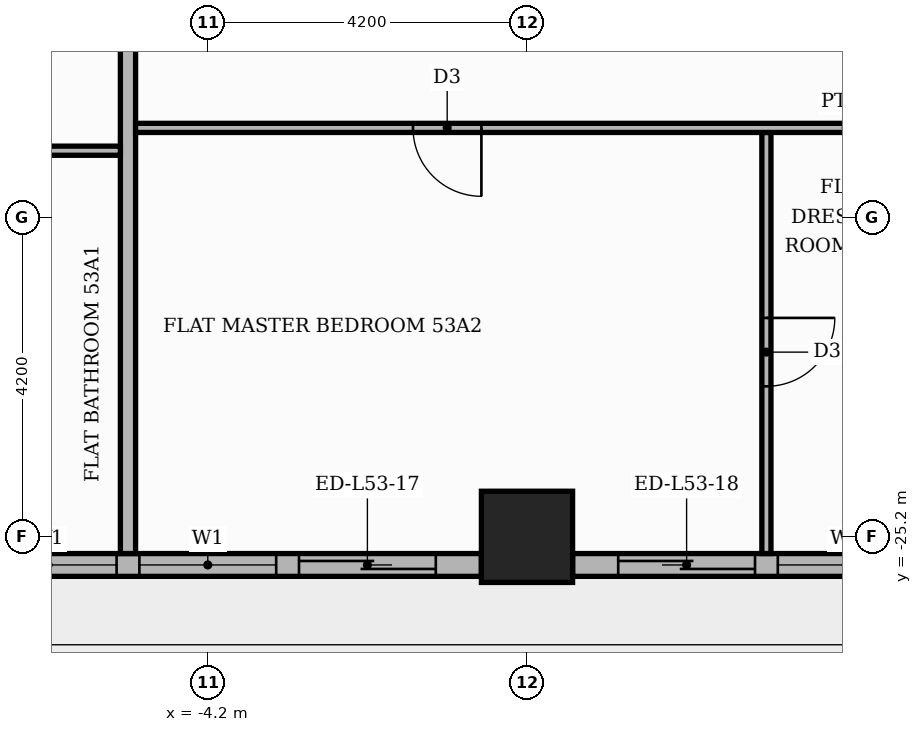
"""IFC4 building model, lengths in metres.
Left out: names, types, materials, properties, quantities, classifications, styles, units other than length and angle.
Written with IfcOpenShell. Run it as: python <this file> out.ifc"""

import sys

from ifc_helpers import new_model, si_unit, direction, frame, frame_2d, origin, origin_2d, place, context, subcontext, project, spatial, rectangle, extrude, element, fill, save


model = new_model("IFC4")
c1 = context("Model", 3, precision=1e-05, world=origin(), true_north=direction((0.0, 1.0)))
c2 = subcontext(c1, "Body", "Model", "MODEL_VIEW")
j1 = project(units=[si_unit("LENGTHUNIT", "METRE"), si_unit("PLANEANGLEUNIT", "RADIAN")], contexts=[c1])
p1 = place(None, origin())
s1 = spatial("IfcSite", under=j1, at=p1, CompositionType="ELEMENT")
p2 = place(p1, origin())
s2 = spatial("IfcBuilding", under=s1, at=p2, CompositionType="ELEMENT")
p3 = place(p2, frame((0.0, 0.0, 223.5)))
s3 = spatial("IfcBuildingStorey", under=s2, at=p3, CompositionType="ELEMENT", Elevation=223.5)
p4 = place(p3, frame((0.0, -25.2, 0.0), z_axis=(0.0, 0.0, 1.0), x_axis=(1.0, 0.0, 0.0)))
e1 = element("IfcColumn", 1, at=p4, inside=s3, PredefinedType="COLUMN", context=c2, shape_type="SweptSolid", body=[
    extrude(rectangle(XDim=1.2, YDim=1.2, at=origin_2d()), origin(), (0.0, 0.0, 1.0), 3.9),
])
p5 = place(p3, frame((-7.8, -25.57, 0.0), z_axis=(0.0, 0.0, 1.0), x_axis=(1.0, 0.0, 0.0)))
e2 = element("IfcWall", 2, at=p5, inside=s3, PredefinedType="STANDARD", context=c2, shape_type="SweptSolid", body=[
    extrude(rectangle(XDim=7.2, YDim=0.3, at=frame_2d((3.6, 0.0))), origin(), (0.0, 0.0, 1.0), 3.48),
])
p6 = place(p5, frame((0.6, 0.0, 0.9)))
e3 = element("IfcOpeningElement", 3, at=p6, cuts=e2, PredefinedType="OPENING", context=c2, shape_type="SweptSolid", body=[
    extrude(rectangle(XDim=1.8, YDim=2.1, at=frame_2d((0.9, 1.05))), frame((0.0, 0.16, 0.0), z_axis=(0.0, -1.0, 0.0), x_axis=(1.0, 0.0, 0.0)), (0.0, 0.0, 1.0), 0.32),
])
p7 = place(p5, frame((2.7, 0.0, 0.9)))
e4 = element("IfcOpeningElement", 4, at=p7, cuts=e2, PredefinedType="OPENING", context=c2, shape_type="SweptSolid", body=[
    extrude(rectangle(XDim=1.8, YDim=2.1, at=frame_2d((0.9, 1.05))), frame((0.0, 0.16, 0.0), z_axis=(0.0, -1.0, 0.0), x_axis=(1.0, 0.0, 0.0)), (0.0, 0.0, 1.0), 0.32),
])
p8 = place(p5, frame((4.8, 0.0, 0.0)))
e5 = element("IfcOpeningElement", 5, at=p8, cuts=e2, PredefinedType="OPENING", context=c2, shape_type="SweptSolid", body=[
    extrude(rectangle(XDim=1.8, YDim=2.4, at=frame_2d((0.9, 1.2))), frame((0.0, 0.16, 0.0), z_axis=(0.0, -1.0, 0.0), x_axis=(1.0, 0.0, 0.0)), (0.0, 0.0, 1.0), 0.32),
])
p9 = place(p3, frame((0.6, -25.57, 0.0), z_axis=(0.0, 0.0, 1.0), x_axis=(1.0, 0.0, 0.0)))
e6 = element("IfcWall", 6, at=p9, inside=s3, PredefinedType="STANDARD", context=c2, shape_type="SweptSolid", body=[
    extrude(rectangle(XDim=7.2, YDim=0.3, at=frame_2d((3.6, 0.0))), origin(), (0.0, 0.0, 1.0), 3.48),
])
p10 = place(p9, frame((0.6, 0.0, 0.0)))
e7 = element("IfcOpeningElement", 7, at=p10, cuts=e6, PredefinedType="OPENING", context=c2, shape_type="SweptSolid", body=[
    extrude(rectangle(XDim=1.8, YDim=2.4, at=frame_2d((0.9, 1.2))), frame((0.0, 0.16, 0.0), z_axis=(0.0, -1.0, 0.0), x_axis=(1.0, 0.0, 0.0)), (0.0, 0.0, 1.0), 0.32),
])
p11 = place(p9, frame((2.7, 0.0, 0.9)))
e8 = element("IfcOpeningElement", 8, at=p11, cuts=e6, PredefinedType="OPENING", context=c2, shape_type="SweptSolid", body=[
    extrude(rectangle(XDim=1.8, YDim=2.1, at=frame_2d((0.9, 1.05))), frame((0.0, 0.16, 0.0), z_axis=(0.0, -1.0, 0.0), x_axis=(1.0, 0.0, 0.0)), (0.0, 0.0, 1.0), 0.32),
])
p12 = place(p9, frame((4.8, 0.0, 0.9)))
e9 = element("IfcOpeningElement", 9, at=p12, cuts=e6, PredefinedType="OPENING", context=c2, shape_type="SweptSolid", body=[
    extrude(rectangle(XDim=1.8, YDim=2.1, at=frame_2d((0.9, 1.05))), frame((0.0, 0.16, 0.0), z_axis=(0.0, -1.0, 0.0), x_axis=(1.0, 0.0, 0.0)), (0.0, 0.0, 1.0), 0.32),
])
p13 = place(p3, frame((-5.25, -25.42, 0.0), z_axis=(0.0, 0.0, 1.0), x_axis=(0.0, 1.0, 0.0)))
e10 = element("IfcWall", 10, at=p13, inside=s3, PredefinedType="PARTITIONING", context=c2, shape_type="SweptSolid", body=[
    extrude(rectangle(XDim=11.67, YDim=0.2, at=frame_2d((5.835, 0.0))), origin(), (0.0, 0.0, 1.0), 3.48),
])
p14 = place(p3, frame((3.15, -25.42, 0.0), z_axis=(0.0, 0.0, 1.0), x_axis=(0.0, 1.0, 0.0)))
e11 = element("IfcWall", 11, at=p14, inside=s3, PredefinedType="PARTITIONING", context=c2, shape_type="SweptSolid", body=[
    extrude(rectangle(XDim=5.54, YDim=0.12, at=frame_2d((2.77, 0.0))), origin(), (0.0, 0.0, 1.0), 3.48),
])
p15 = place(p14, frame((2.2, 0.0, 0.0)))
e12 = element("IfcOpeningElement", 12, at=p15, cuts=e11, PredefinedType="OPENING", context=c2, shape_type="SweptSolid", body=[
    extrude(rectangle(XDim=0.9, YDim=2.1, at=frame_2d((0.45, 1.05))), frame((0.0, 0.07, 0.0), z_axis=(0.0, -1.0, 0.0), x_axis=(1.0, 0.0, 0.0)), (0.0, 0.0, 1.0), 0.14),
])
p16 = place(p3, frame((-25.42, -20.12, 0.0), z_axis=(0.0, 0.0, 1.0), x_axis=(1.0, 0.0, 0.0)))
e13 = element("IfcWall", 13, at=p16, inside=s3, PredefinedType="PARTITIONING", context=c2, shape_type="SweptSolid", body=[
    extrude(rectangle(XDim=20.07, YDim=0.12, at=frame_2d((10.035, 0.0))), origin(), (0.0, 0.0, 1.0), 3.48),
])
p17 = place(p16, frame((10.22, 0.0, 0.0)))
e14 = element("IfcOpeningElement", 14, at=p17, cuts=e13, PredefinedType="OPENING", context=c2, shape_type="SweptSolid", body=[
    extrude(rectangle(XDim=1.0, YDim=2.1, at=frame_2d((0.5, 1.05))), frame((0.0, 0.07, 0.0), z_axis=(0.0, -1.0, 0.0), x_axis=(1.0, 0.0, 0.0)), (0.0, 0.0, 1.0), 0.14),
])
p18 = place(p16, frame((13.42, 0.0, 0.0)))
e15 = element("IfcOpeningElement", 15, at=p18, cuts=e13, PredefinedType="OPENING", context=c2, shape_type="SweptSolid", body=[
    extrude(rectangle(XDim=0.9, YDim=2.1, at=frame_2d((0.45, 1.05))), frame((0.0, 0.07, 0.0), z_axis=(0.0, -1.0, 0.0), x_axis=(1.0, 0.0, 0.0)), (0.0, 0.0, 1.0), 0.14),
])
p19 = place(p3, frame((-5.15, -19.82, 0.0), z_axis=(0.0, 0.0, 1.0), x_axis=(1.0, 0.0, 0.0)))
e16 = element("IfcWall", 16, at=p19, inside=s3, PredefinedType="PARTITIONING", context=c2, shape_type="SweptSolid", body=[
    extrude(rectangle(XDim=18.7, YDim=0.12, at=frame_2d((9.35, 0.0))), origin(), (0.0, 0.0, 1.0), 3.48),
])
p20 = place(p19, frame((3.65, 0.0, 0.0)))
e17 = element("IfcOpeningElement", 17, at=p20, cuts=e16, PredefinedType="OPENING", context=c2, shape_type="SweptSolid", body=[
    extrude(rectangle(XDim=0.9, YDim=2.1, at=frame_2d((0.45, 1.05))), frame((0.0, 0.07, 0.0), z_axis=(0.0, -1.0, 0.0), x_axis=(1.0, 0.0, 0.0)), (0.0, 0.0, 1.0), 0.14),
])
p21 = place(p19, frame((15.15, 0.0, 0.0)))
e18 = element("IfcOpeningElement", 18, at=p21, cuts=e16, PredefinedType="OPENING", context=c2, shape_type="SweptSolid", body=[
    extrude(rectangle(XDim=1.0, YDim=2.1, at=frame_2d((0.5, 1.05))), frame((0.0, 0.07, 0.0), z_axis=(0.0, -1.0, 0.0), x_axis=(1.0, 0.0, 0.0)), (0.0, 0.0, 1.0), 0.14),
])
p22 = place(p6, origin())
e19 = element("IfcWindow", 19, at=p22, inside=s3, PartitioningType="SINGLE_PANEL", PredefinedType="WINDOW", context=c2, shape_type="SweptSolid", body=[
    extrude(rectangle(XDim=1.8, YDim=2.1, at=frame_2d((0.9, 1.05))), frame((0.0, 0.03, 0.0), z_axis=(0.0, -1.0, 0.0), x_axis=(1.0, 0.0, 0.0)), (0.0, 0.0, 1.0), 0.06),
])
fill(e3, e19)
p23 = place(p7, origin())
e20 = element("IfcWindow", 20, at=p23, inside=s3, PartitioningType="SINGLE_PANEL", PredefinedType="WINDOW", context=c2, shape_type="SweptSolid", body=[
    extrude(rectangle(XDim=1.8, YDim=2.1, at=frame_2d((0.9, 1.05))), frame((0.0, 0.03, 0.0), z_axis=(0.0, -1.0, 0.0), x_axis=(1.0, 0.0, 0.0)), (0.0, 0.0, 1.0), 0.06),
])
fill(e4, e20)
p24 = place(p8, origin())
e21 = element("IfcDoor", 21, at=p24, inside=s3, OperationType="SLIDING_TO_RIGHT", PredefinedType="DOOR", context=c2, shape_type="SweptSolid", body=[
    extrude(rectangle(XDim=1.8, YDim=2.4, at=frame_2d((0.9, 1.2))), frame((0.0, 0.025, 0.0), z_axis=(0.0, -1.0, 0.0), x_axis=(1.0, 0.0, 0.0)), (0.0, 0.0, 1.0), 0.05),
])
fill(e5, e21)
p25 = place(p10, origin())
e22 = element("IfcDoor", 22, at=p25, inside=s3, OperationType="SLIDING_TO_LEFT", PredefinedType="DOOR", context=c2, shape_type="SweptSolid", body=[
    extrude(rectangle(XDim=1.8, YDim=2.4, at=frame_2d((0.9, 1.2))), frame((0.0, 0.025, 0.0), z_axis=(0.0, -1.0, 0.0), x_axis=(1.0, 0.0, 0.0)), (0.0, 0.0, 1.0), 0.05),
])
fill(e7, e22)
p26 = place(p11, origin())
e23 = element("IfcWindow", 23, at=p26, inside=s3, PartitioningType="SINGLE_PANEL", PredefinedType="WINDOW", context=c2, shape_type="SweptSolid", body=[
    extrude(rectangle(XDim=1.8, YDim=2.1, at=frame_2d((0.9, 1.05))), frame((0.0, 0.03, 0.0), z_axis=(0.0, -1.0, 0.0), x_axis=(1.0, 0.0, 0.0)), (0.0, 0.0, 1.0), 0.06),
])
fill(e8, e23)
p27 = place(p20, frame((0.9, 0.0, 0.0), z_axis=(0.0, 0.0, 1.0), x_axis=(-1.0, 0.0, 0.0)))
e24 = element("IfcDoor", 24, at=p27, inside=s3, OperationType="SINGLE_SWING_RIGHT", PredefinedType="DOOR", context=c2, shape_type="SweptSolid", body=[
    extrude(rectangle(XDim=0.9, YDim=2.1, at=frame_2d((0.45, 1.05))), frame((0.0, 0.025, 0.0), z_axis=(0.0, -1.0, 0.0), x_axis=(1.0, 0.0, 0.0)), (0.0, 0.0, 1.0), 0.05),
])
fill(e17, e24)
p28 = place(p15, frame((0.9, 0.0, 0.0), z_axis=(0.0, 0.0, 1.0), x_axis=(-1.0, 0.0, 0.0)))
e25 = element("IfcDoor", 25, at=p28, inside=s3, OperationType="SINGLE_SWING_RIGHT", PredefinedType="DOOR", context=c2, shape_type="SweptSolid", body=[
    extrude(rectangle(XDim=0.9, YDim=2.1, at=frame_2d((0.45, 1.05))), frame((0.0, 0.025, 0.0), z_axis=(0.0, -1.0, 0.0), x_axis=(1.0, 0.0, 0.0)), (0.0, 0.0, 1.0), 0.05),
])
fill(e12, e25)
save(model, sys.argv[1])
